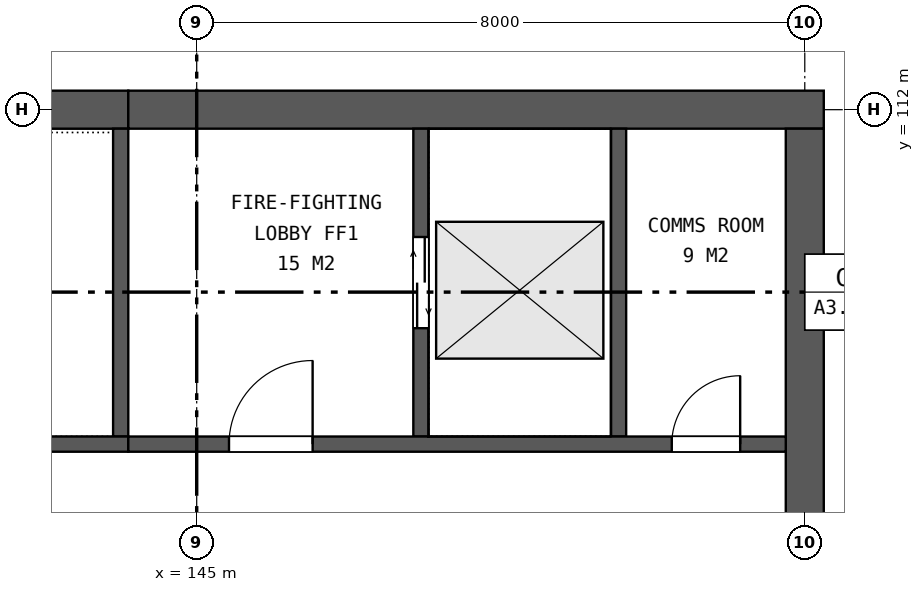
"""IFC4 building model, lengths in metres.
Left out: names, types, materials, properties, quantities, classifications, styles, units other than length and angle.
Written with IfcOpenShell. Run it as: python <this file> out.ifc"""

import sys

from ifc_helpers import new_model, si_unit, direction, frame, frame_2d, origin, place, context, subcontext, project, spatial, rectangle, extrude, element, fill, save


model = new_model("IFC4")
c1 = context("Model", 3, precision=1e-05, world=origin(), true_north=direction((0.0, 1.0)))
c2 = subcontext(c1, "Body", "Model", "MODEL_VIEW")
j1 = project(units=[si_unit("LENGTHUNIT", "METRE"), si_unit("PLANEANGLEUNIT", "RADIAN")], contexts=[c1])
p1 = place(None, origin())
s1 = spatial("IfcSite", under=j1, at=p1, CompositionType="ELEMENT")
p2 = place(p1, origin())
s2 = spatial("IfcBuilding", under=s1, at=p2, CompositionType="ELEMENT")
p3 = place(p2, frame((0.0, 0.0, 344.9)))
s3 = spatial("IfcBuildingStorey", under=s2, at=p3, CompositionType="ELEMENT", Elevation=344.9)
p4 = place(p3, frame((137.0, 112.0, 0.0), z_axis=(0.0, 0.0, 1.0), x_axis=(1.0, 0.0, 0.0)))
e1 = element("IfcWall", 1, at=p4, inside=s3, PredefinedType="SHEAR", context=c2, shape_type="SweptSolid", body=[
    extrude(rectangle(XDim=7.1, YDim=0.5, at=frame_2d((3.55, 0.0))), origin(), (0.0, 0.0, 1.0), 4.2),
])
p5 = place(p3, frame((144.1, 112.0, 0.0), z_axis=(0.0, 0.0, 1.0), x_axis=(1.0, 0.0, 0.0)))
e2 = element("IfcWall", 2, at=p5, inside=s3, PredefinedType="SHEAR", context=c2, shape_type="SweptSolid", body=[
    extrude(rectangle(XDim=9.15, YDim=0.5, at=frame_2d((4.575, 0.0))), origin(), (0.0, 0.0, 1.0), 4.2),
])
p6 = place(p3, frame((153.0, 88.25, 0.0), z_axis=(0.0, 0.0, 1.0), x_axis=(0.0, 1.0, 0.0)))
e3 = element("IfcWall", 3, at=p6, inside=s3, PredefinedType="SHEAR", context=c2, shape_type="SweptSolid", body=[
    extrude(rectangle(XDim=23.5, YDim=0.5, at=frame_2d((11.75, 0.0))), origin(), (0.0, 0.0, 1.0), 4.2),
])
p7 = place(p6, frame((9.95, 0.0, 0.15)))
e4 = element("IfcOpeningElement", 4, at=p7, cuts=e3, PredefinedType="OPENING", context=c2, shape_type="SweptSolid", body=[
    extrude(rectangle(XDim=3.6, YDim=3.0, at=frame_2d((1.8, 1.5))), frame((0.0, 0.26, 0.0), z_axis=(0.0, -1.0, 0.0), x_axis=(1.0, 0.0, 0.0)), (0.0, 0.0, 1.0), 0.52),
])
p8 = place(p3, frame((144.0, 107.7, 0.0), z_axis=(0.0, 0.0, 1.0), x_axis=(0.0, 1.0, 0.0)))
e5 = element("IfcWall", 5, at=p8, inside=s3, PredefinedType="SHEAR", context=c2, shape_type="SweptSolid", body=[
    extrude(rectangle(XDim=4.05, YDim=0.2, at=frame_2d((2.025, 0.0))), origin(), (0.0, 0.0, 1.0), 4.2),
])
p9 = place(p3, frame((147.95, 107.7, 0.0), z_axis=(0.0, 0.0, 1.0), x_axis=(0.0, 1.0, 0.0)))
e6 = element("IfcWall", 6, at=p9, inside=s3, PredefinedType="SHEAR", context=c2, shape_type="SweptSolid", body=[
    extrude(rectangle(XDim=4.05, YDim=0.2, at=frame_2d((2.025, 0.0))), origin(), (0.0, 0.0, 1.0), 4.2),
])
p10 = place(p9, frame((1.425, 0.0, 0.0)))
e7 = element("IfcOpeningElement", 7, at=p10, cuts=e6, PredefinedType="OPENING", context=c2, shape_type="SweptSolid", body=[
    extrude(rectangle(XDim=1.2, YDim=2.1, at=frame_2d((0.6, 1.05))), frame((0.0, 0.11, 0.0), z_axis=(0.0, -1.0, 0.0), x_axis=(1.0, 0.0, 0.0)), (0.0, 0.0, 1.0), 0.22),
])
p11 = place(p3, frame((150.55, 107.7, 0.0), z_axis=(0.0, 0.0, 1.0), x_axis=(0.0, 1.0, 0.0)))
e8 = element("IfcWall", 8, at=p11, inside=s3, PredefinedType="SHEAR", context=c2, shape_type="SweptSolid", body=[
    extrude(rectangle(XDim=4.05, YDim=0.2, at=frame_2d((2.025, 0.0))), origin(), (0.0, 0.0, 1.0), 4.2),
])
p12 = place(p3, frame((137.3, 107.6, 0.0), z_axis=(0.0, 0.0, 1.0), x_axis=(1.0, 0.0, 0.0)))
e9 = element("IfcWall", 9, at=p12, inside=s3, PredefinedType="SHEAR", context=c2, shape_type="SweptSolid", body=[
    extrude(rectangle(XDim=6.8, YDim=0.2, at=frame_2d((3.4, 0.0))), origin(), (0.0, 0.0, 1.0), 4.2),
])
p13 = place(p12, frame((0.15, 0.0, 0.0)))
e10 = element("IfcOpeningElement", 10, at=p13, cuts=e9, PredefinedType="OPENING", context=c2, shape_type="SweptSolid", body=[
    extrude(rectangle(XDim=1.0, YDim=2.1, at=frame_2d((0.5, 1.05))), frame((0.0, 0.11, 0.0), z_axis=(0.0, -1.0, 0.0), x_axis=(1.0, 0.0, 0.0)), (0.0, 0.0, 1.0), 0.22),
])
p14 = place(p3, frame((144.1, 107.6, 0.0), z_axis=(0.0, 0.0, 1.0), x_axis=(1.0, 0.0, 0.0)))
e11 = element("IfcWall", 11, at=p14, inside=s3, PredefinedType="SHEAR", context=c2, shape_type="SweptSolid", body=[
    extrude(rectangle(XDim=8.65, YDim=0.2, at=frame_2d((4.325, 0.0))), origin(), (0.0, 0.0, 1.0), 4.2),
])
p15 = place(p14, frame((1.325, 0.0, 0.0)))
e12 = element("IfcOpeningElement", 12, at=p15, cuts=e11, PredefinedType="OPENING", context=c2, shape_type="SweptSolid", body=[
    extrude(rectangle(XDim=1.1, YDim=2.1, at=frame_2d((0.55, 1.05))), frame((0.0, 0.11, 0.0), z_axis=(0.0, -1.0, 0.0), x_axis=(1.0, 0.0, 0.0)), (0.0, 0.0, 1.0), 0.22),
])
p16 = place(p14, frame((7.15, 0.0, 0.0)))
e13 = element("IfcOpeningElement", 13, at=p16, cuts=e11, PredefinedType="OPENING", context=c2, shape_type="SweptSolid", body=[
    extrude(rectangle(XDim=0.9, YDim=2.1, at=frame_2d((0.45, 1.05))), frame((0.0, 0.11, 0.0), z_axis=(0.0, -1.0, 0.0), x_axis=(1.0, 0.0, 0.0)), (0.0, 0.0, 1.0), 0.22),
])
p17 = place(p10, origin())
e14 = element("IfcDoor", 14, at=p17, inside=s3, OperationType="DOUBLE_DOOR_SLIDING", PredefinedType="DOOR", context=c2, shape_type="SweptSolid", body=[
    extrude(rectangle(XDim=1.2, YDim=2.1, at=frame_2d((0.6, 1.05))), frame((0.0, 0.025, 0.0), z_axis=(0.0, -1.0, 0.0), x_axis=(1.0, 0.0, 0.0)), (0.0, 0.0, 1.0), 0.05),
])
fill(e7, e14)
p18 = place(p15, origin())
e15 = element("IfcDoor", 15, at=p18, inside=s3, OperationType="SINGLE_SWING_RIGHT", PredefinedType="DOOR", context=c2, shape_type="SweptSolid", body=[
    extrude(rectangle(XDim=1.1, YDim=2.1, at=frame_2d((0.55, 1.05))), frame((0.0, 0.025, 0.0), z_axis=(0.0, -1.0, 0.0), x_axis=(1.0, 0.0, 0.0)), (0.0, 0.0, 1.0), 0.05),
])
fill(e12, e15)
p19 = place(p16, origin())
e16 = element("IfcDoor", 16, at=p19, inside=s3, OperationType="SINGLE_SWING_RIGHT", PredefinedType="DOOR", context=c2, shape_type="SweptSolid", body=[
    extrude(rectangle(XDim=0.9, YDim=2.1, at=frame_2d((0.45, 1.05))), frame((0.0, 0.025, 0.0), z_axis=(0.0, -1.0, 0.0), x_axis=(1.0, 0.0, 0.0)), (0.0, 0.0, 1.0), 0.05),
])
fill(e13, e16)
save(model, sys.argv[1])
